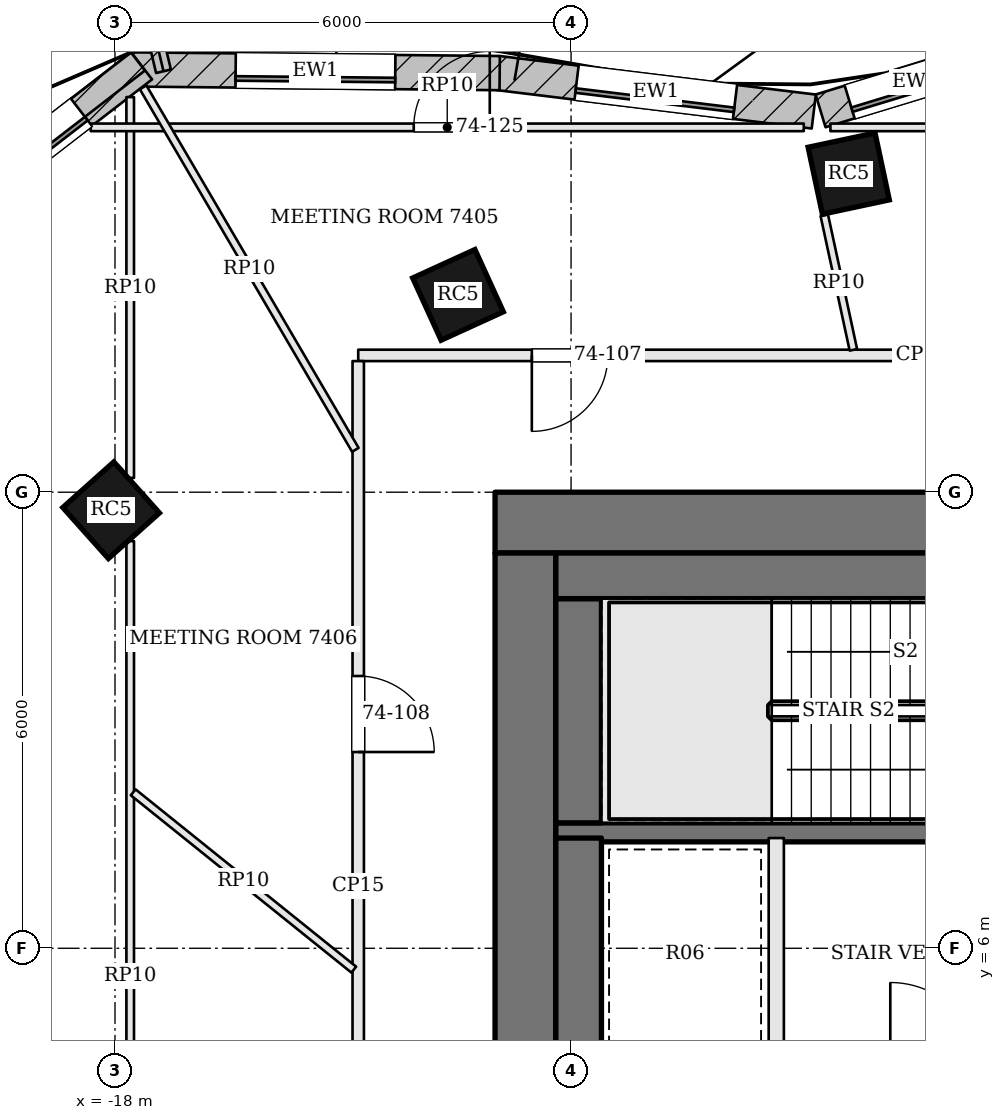
"""IFC4 building model, lengths in metres.
Left out: names, types, materials, properties, quantities, classifications, styles, units other than length and angle.
Written with IfcOpenShell. Run it as: python <this file> out.ifc"""

import sys

from ifc_helpers import new_model, si_unit, direction, frame, frame_2d, origin, origin_2d, place, context, subcontext, project, spatial, rectangle, extrude, element, fill, save


model = new_model("IFC4")
c1 = context("Model", 3, precision=1e-05, world=origin(), true_north=direction((0.0, 1.0)))
c2 = subcontext(c1, "Body", "Model", "MODEL_VIEW")
j1 = project(units=[si_unit("LENGTHUNIT", "METRE"), si_unit("PLANEANGLEUNIT", "RADIAN")], contexts=[c1])
p1 = place(None, origin())
s1 = spatial("IfcSite", under=j1, at=p1, CompositionType="ELEMENT")
p2 = place(p1, origin())
s2 = spatial("IfcBuilding", under=s1, at=p2, CompositionType="ELEMENT")
p3 = place(p2, frame((0.0, 0.0, 300.0)))
s3 = spatial("IfcBuildingStorey", under=s2, at=p3, CompositionType="ELEMENT", Elevation=300.0)
p4 = place(p3, frame((-13.0, 11.6, 0.0), z_axis=(0.0, 0.0, 1.0), x_axis=(1.0, 0.0, 0.0)))
e1 = element("IfcWall", 1, at=p4, inside=s3, PredefinedType="SHEAR", context=c2, shape_type="SweptSolid", body=[
    extrude(rectangle(XDim=26.0, YDim=0.8, at=frame_2d((13.0, 0.0))), origin(), (0.0, 0.0, 1.0), 3.9),
])
p5 = place(p4, frame((8.975, 0.0, 0.0)))
e2 = element("IfcOpeningElement", 2, at=p5, cuts=e1, PredefinedType="OPENING", context=c2, shape_type="SweptSolid", body=[
    extrude(rectangle(XDim=0.7, YDim=2.1, at=frame_2d((0.35, 1.05))), frame((0.0, 0.41, 0.0), z_axis=(0.0, -1.0, 0.0), x_axis=(1.0, 0.0, 0.0)), (0.0, 0.0, 1.0), 0.82),
])
p6 = place(p4, frame((11.025, 0.0, 0.0)))
e3 = element("IfcOpeningElement", 3, at=p6, cuts=e1, PredefinedType="OPENING", context=c2, shape_type="SweptSolid", body=[
    extrude(rectangle(XDim=0.7, YDim=2.1, at=frame_2d((0.35, 1.05))), frame((0.0, 0.41, 0.0), z_axis=(0.0, -1.0, 0.0), x_axis=(1.0, 0.0, 0.0)), (0.0, 0.0, 1.0), 0.82),
])
p7 = place(p4, frame((12.925, 0.0, 0.0)))
e4 = element("IfcOpeningElement", 4, at=p7, cuts=e1, PredefinedType="OPENING", context=c2, shape_type="SweptSolid", body=[
    extrude(rectangle(XDim=1.0, YDim=2.1, at=frame_2d((0.5, 1.05))), frame((0.0, 0.41, 0.0), z_axis=(0.0, -1.0, 0.0), x_axis=(1.0, 0.0, 0.0)), (0.0, 0.0, 1.0), 0.82),
])
p8 = place(p4, frame((15.775, 0.0, 0.0)))
e5 = element("IfcOpeningElement", 5, at=p8, cuts=e1, PredefinedType="OPENING", context=c2, shape_type="SweptSolid", body=[
    extrude(rectangle(XDim=1.0, YDim=2.1, at=frame_2d((0.5, 1.05))), frame((0.0, 0.41, 0.0), z_axis=(0.0, -1.0, 0.0), x_axis=(1.0, 0.0, 0.0)), (0.0, 0.0, 1.0), 0.82),
])
p9 = place(p3, frame((-12.6, -2.2, 0.0), z_axis=(0.0, 0.0, 1.0), x_axis=(0.0, 1.0, 0.0)))
e6 = element("IfcWall", 6, at=p9, inside=s3, PredefinedType="SHEAR", context=c2, shape_type="SweptSolid", body=[
    extrude(rectangle(XDim=13.4, YDim=0.8, at=frame_2d((6.7, 0.0))), origin(), (0.0, 0.0, 1.0), 3.9),
])
p10 = place(p9, frame((4.2, 0.0, 0.0)))
e7 = element("IfcOpeningElement", 7, at=p10, cuts=e6, PredefinedType="OPENING", context=c2, shape_type="SweptSolid", body=[
    extrude(rectangle(XDim=1.8, YDim=2.1, at=frame_2d((0.9, 1.05))), frame((0.0, 0.41, 0.0), z_axis=(0.0, -1.0, 0.0), x_axis=(1.0, 0.0, 0.0)), (0.0, 0.0, 1.0), 0.82),
])
for number, where, z_axis, x_axis in (
    (8, (-8.347, 16.192, 0.0), (0.0, 0.0, 1.0), (-0.978, -0.209, 0.0)),
    (9, (-13.487, 14.596, 0.0), (0.0, 0.0, 1.0), (-0.91, -0.415, 0.0)),
    (10, (-18.051, 11.763, 0.0), (0.0, 0.0, 1.0), (-0.746, -0.666, 0.0)),
):
    element("IfcColumn", number, at=place(p3, frame(where, z_axis=z_axis, x_axis=x_axis)), inside=s3, PredefinedType="COLUMN", context=c2, shape_type="SweptSolid", body=[
        extrude(rectangle(XDim=0.9, YDim=0.9, at=origin_2d()), origin(), (0.0, 0.0, 1.0), 3.9),
    ])
p11 = place(p3, frame((-6.229, 17.774, 0.0), z_axis=(0.0, 0.0, 1.0), x_axis=(-0.95663749396, -0.291281144515, 0.0)))
e11 = element("IfcWall", 11, at=p11, inside=s3, PredefinedType="SOLIDWALL", context=c2, shape_type="SweptSolid", body=[
    extrude(rectangle(XDim=2.601, YDim=0.45, at=frame_2d((1.3, 0.0))), origin(), (0.0, 0.0, 1.0), 3.7),
])
p12 = place(p11, frame((0.4, 0.0, 0.9)))
e12 = element("IfcOpeningElement", 12, at=p12, cuts=e11, PredefinedType="OPENING", context=c2, shape_type="SweptSolid", body=[
    extrude(rectangle(XDim=1.8, YDim=2.3, at=frame_2d((0.9, 1.15))), frame((0.0, 0.235, 0.0), z_axis=(0.0, -1.0, 0.0), x_axis=(1.0, 0.0, 0.0)), (0.0, 0.0, 1.0), 0.47),
])
p13 = place(p3, frame((-8.807, 17.008, 0.0), z_axis=(0.0, 0.0, 1.0), x_axis=(-0.992654419289, 0.120984312483, 0.0)))
e13 = element("IfcWall", 13, at=p13, inside=s3, PredefinedType="SOLIDWALL", context=c2, shape_type="SweptSolid", body=[
    extrude(rectangle(XDim=4.187, YDim=0.45, at=frame_2d((2.094, 0.0))), origin(), (0.0, 0.0, 1.0), 3.7),
])
p14 = place(p13, frame((1.044, 0.0, 0.9)))
e14 = element("IfcOpeningElement", 14, at=p14, cuts=e13, PredefinedType="OPENING", context=c2, shape_type="SweptSolid", body=[
    extrude(rectangle(XDim=2.1, YDim=2.3, at=frame_2d((1.05, 1.15))), frame((0.0, 0.235, 0.0), z_axis=(0.0, -1.0, 0.0), x_axis=(1.0, 0.0, 0.0)), (0.0, 0.0, 1.0), 0.47),
])
p15 = place(p3, frame((-12.939, 17.514, 0.0), z_axis=(0.0, 0.0, 1.0), x_axis=(-0.999950280333, 0.00997180335, 0.0)))
e15 = element("IfcWall", 15, at=p15, inside=s3, PredefinedType="SOLIDWALL", context=c2, shape_type="SweptSolid", body=[
    extrude(rectangle(XDim=4.848, YDim=0.45, at=frame_2d((2.424, 0.0))), origin(), (0.0, 0.0, 1.0), 3.7),
])
p16 = place(p15, frame((1.374, 0.0, 0.9)))
e16 = element("IfcOpeningElement", 16, at=p16, cuts=e15, PredefinedType="OPENING", context=c2, shape_type="SweptSolid", body=[
    extrude(rectangle(XDim=2.1, YDim=2.3, at=frame_2d((1.05, 1.15))), frame((0.0, 0.235, 0.0), z_axis=(0.0, -1.0, 0.0), x_axis=(1.0, 0.0, 0.0)), (0.0, 0.0, 1.0), 0.47),
])
p17 = place(p3, frame((-17.649, 17.609, 0.0), z_axis=(0.0, 0.0, 1.0), x_axis=(-0.791693388686, -0.610918634771, 0.0)))
e17 = element("IfcWall", 17, at=p17, inside=s3, PredefinedType="SOLIDWALL", context=c2, shape_type="SweptSolid", body=[
    extrude(rectangle(XDim=4.1, YDim=0.45, at=frame_2d((2.05, 0.0))), origin(), (0.0, 0.0, 1.0), 3.7),
])
p18 = place(p17, frame((1.0, 0.0, 0.9)))
e18 = element("IfcOpeningElement", 18, at=p18, cuts=e17, PredefinedType="OPENING", context=c2, shape_type="SweptSolid", body=[
    extrude(rectangle(XDim=2.1, YDim=2.3, at=frame_2d((1.05, 1.15))), frame((0.0, 0.235, 0.0), z_axis=(0.0, -1.0, 0.0), x_axis=(1.0, 0.0, 0.0)), (0.0, 0.0, 1.0), 0.47),
])
p19 = place(p3, frame((-17.362, 17.538, 0.0), z_axis=(0.0, 0.0, 1.0), x_axis=(-0.230469860183, 0.973079464148, 0.0)))
e19 = element("IfcWall", 19, at=p19, inside=s3, PredefinedType="SOLIDWALL", context=c2, shape_type="SweptSolid", body=[
    extrude(rectangle(XDim=1.75, YDim=0.2, at=frame_2d((0.875, 0.0))), origin(), (0.0, 0.0, 1.0), 3.7),
])
p20 = place(p3, frame((-17.698, 17.666, 3.9), z_axis=(0.0, 0.0, 1.0), x_axis=(-0.791652356246, -0.610971805282, 0.0)))
e20 = element("IfcWall", 20, at=p20, inside=s3, PredefinedType="PARAPET", context=c2, shape_type="SweptSolid", body=[
    extrude(rectangle(XDim=3.974, YDim=0.3, at=frame_2d((1.987, 0.0))), origin(), (0.0, 0.0, 1.0), 1.1),
])
p21 = place(p3, frame((-12.2, 7.525, 0.0), z_axis=(0.0, 0.0, 1.0), x_axis=(1.0, 0.0, 0.0)))
e21 = element("IfcWall", 21, at=p21, inside=s3, PredefinedType="SOLIDWALL", context=c2, shape_type="SweptSolid", body=[
    extrude(rectangle(XDim=7.1, YDim=0.25, at=frame_2d((3.55, 0.0))), origin(), (0.0, 0.0, 1.0), 3.7),
])
p22 = place(p21, frame((5.8, 0.0, 0.0)))
e22 = element("IfcOpeningElement", 22, at=p22, cuts=e21, PredefinedType="OPENING", context=c2, shape_type="SweptSolid", body=[
    extrude(rectangle(XDim=1.2, YDim=2.1, at=frame_2d((0.6, 1.05))), frame((0.0, 0.135, 0.0), z_axis=(0.0, -1.0, 0.0), x_axis=(1.0, 0.0, 0.0)), (0.0, 0.0, 1.0), 0.27),
])
p23 = place(p3, frame((-9.3, 4.45, 0.0), z_axis=(0.0, 0.0, 1.0), x_axis=(0.0, 1.0, 0.0)))
e23 = element("IfcWall", 23, at=p23, inside=s3, PredefinedType="SOLIDWALL", context=c2, shape_type="SweptSolid", body=[
    extrude(rectangle(XDim=3.0, YDim=0.2, at=frame_2d((1.5, 0.0))), origin(), (0.0, 0.0, 1.0), 3.7),
])
p24 = place(p3, frame((-11.9, 4.45, 0.0), z_axis=(0.0, 0.0, 1.0), x_axis=(0.0, 1.0, 0.0)))
e24 = element("IfcWall", 24, at=p24, inside=s3, PredefinedType="SOLIDWALL", context=c2, shape_type="SweptSolid", body=[
    extrude(rectangle(XDim=3.0, YDim=0.6, at=frame_2d((1.5, 0.0))), origin(), (0.0, 0.0, 1.0), 3.7),
])
p25 = place(p3, frame((-11.9, 7.65, 0.0), z_axis=(0.0, 0.0, 1.0), x_axis=(0.0, 1.0, 0.0)))
e25 = element("IfcWall", 25, at=p25, inside=s3, PredefinedType="SOLIDWALL", context=c2, shape_type="SweptSolid", body=[
    extrude(rectangle(XDim=2.95, YDim=0.6, at=frame_2d((1.475, 0.0))), origin(), (0.0, 0.0, 1.0), 3.7),
])
p26 = place(p3, frame((-12.2, 10.9, 0.0), z_axis=(0.0, 0.0, 1.0), x_axis=(1.0, 0.0, 0.0)))
e26 = element("IfcWall", 26, at=p26, inside=s3, PredefinedType="SOLIDWALL", context=c2, shape_type="SweptSolid", body=[
    extrude(rectangle(XDim=7.1, YDim=0.6, at=frame_2d((3.55, 0.0))), origin(), (0.0, 0.0, 1.0), 3.7),
])
p27 = place(p3, frame((0.034, 13.8, 0.0), z_axis=(0.0, 0.0, 1.0), x_axis=(-1.0, 0.0, 0.0)))
e27 = element("IfcWall", 27, at=p27, inside=s3, PredefinedType="PARTITIONING", context=c2, shape_type="SweptSolid", body=[
    extrude(rectangle(XDim=14.834, YDim=0.15, at=frame_2d((7.417, 0.0))), origin(), (0.0, 0.0, 1.0), 3.198),
])
p28 = place(p27, frame((3.214, 0.0, 0.0)))
e28 = element("IfcOpeningElement", 28, at=p28, cuts=e27, PredefinedType="OPENING", context=c2, shape_type="SweptSolid", body=[
    extrude(rectangle(XDim=1.8, YDim=2.1, at=frame_2d((0.9, 1.05))), frame((0.0, 0.085, 0.0), z_axis=(0.0, -1.0, 0.0), x_axis=(1.0, 0.0, 0.0)), (0.0, 0.0, 1.0), 0.17),
])
p29 = place(p27, frame((11.55, 0.0, 0.0)))
e29 = element("IfcOpeningElement", 29, at=p29, cuts=e27, PredefinedType="OPENING", context=c2, shape_type="SweptSolid", body=[
    extrude(rectangle(XDim=1.0, YDim=2.4, at=frame_2d((0.5, 1.2))), frame((0.0, 0.085, 0.0), z_axis=(0.0, -1.0, 0.0), x_axis=(1.0, 0.0, 0.0)), (0.0, 0.0, 1.0), 0.17),
])
p30 = place(p3, frame((-14.8, 13.725, 0.0), z_axis=(0.0, 0.0, 1.0), x_axis=(0.0, -1.0, 0.0)))
e30 = element("IfcWall", 30, at=p30, inside=s3, PredefinedType="PARTITIONING", context=c2, shape_type="SweptSolid", body=[
    extrude(rectangle(XDim=13.821, YDim=0.15, at=frame_2d((6.911, 0.0))), origin(), (0.0, 0.0, 1.0), 3.198),
])
p31 = place(p30, frame((4.143, 0.0, 0.0)))
e31 = element("IfcOpeningElement", 31, at=p31, cuts=e30, PredefinedType="OPENING", context=c2, shape_type="SweptSolid", body=[
    extrude(rectangle(XDim=1.0, YDim=2.4, at=frame_2d((0.5, 1.2))), frame((0.0, 0.085, 0.0), z_axis=(0.0, -1.0, 0.0), x_axis=(1.0, 0.0, 0.0)), (0.0, 0.0, 1.0), 0.17),
])
p32 = place(p30, frame((10.35, 0.0, 0.0)))
e32 = element("IfcOpeningElement", 32, at=p32, cuts=e30, PredefinedType="OPENING", context=c2, shape_type="SweptSolid", body=[
    extrude(rectangle(XDim=1.0, YDim=2.1, at=frame_2d((0.5, 1.05))), frame((0.0, 0.085, 0.0), z_axis=(0.0, -1.0, 0.0), x_axis=(1.0, 0.0, 0.0)), (0.0, 0.0, 1.0), 0.17),
])
p33 = place(p3, frame((-17.8, -0.09, 0.0), z_axis=(0.0, 0.0, 1.0), x_axis=(0.0, 1.0, 0.0)))
e33 = element("IfcWall", 33, at=p33, inside=s3, PredefinedType="PARTITIONING", context=c2, shape_type="SweptSolid", body=[
    extrude(rectangle(XDim=11.447, YDim=0.1, at=frame_2d((5.724, 0.0))), origin(), (0.0, 0.0, 1.0), 3.184),
])
p34 = place(p33, frame((2.748, 0.0, 0.0)))
e34 = element("IfcOpeningElement", 34, at=p34, cuts=e33, PredefinedType="OPENING", context=c2, shape_type="SweptSolid", body=[
    extrude(rectangle(XDim=0.9, YDim=2.1, at=frame_2d((0.45, 1.05))), frame((0.0, 0.06, 0.0), z_axis=(0.0, -1.0, 0.0), x_axis=(1.0, 0.0, 0.0)), (0.0, 0.0, 1.0), 0.12),
])
p35 = place(p3, frame((-17.8, 12.188, 0.0), z_axis=(0.0, 0.0, 1.0), x_axis=(0.0, 1.0, 0.0)))
e35 = element("IfcWall", 35, at=p35, inside=s3, PredefinedType="PARTITIONING", context=c2, shape_type="SweptSolid", body=[
    extrude(rectangle(XDim=5.011, YDim=0.1, at=frame_2d((2.505, 0.0))), origin(), (0.0, 0.0, 1.0), 3.184),
])
p36 = place(p3, frame((-18.319, 16.8, 0.0), z_axis=(0.0, 0.0, 1.0), x_axis=(1.0, 0.0, 0.0)))
e36 = element("IfcWall", 36, at=p36, inside=s3, PredefinedType="PARTITIONING", context=c2, shape_type="SweptSolid", body=[
    extrude(rectangle(XDim=9.381, YDim=0.1, at=frame_2d((4.69, 0.0))), origin(), (0.0, 0.0, 1.0), 3.184),
])
p37 = place(p36, frame((4.25, 0.0, 0.0)))
e37 = element("IfcOpeningElement", 37, at=p37, cuts=e36, PredefinedType="OPENING", context=c2, shape_type="SweptSolid", body=[
    extrude(rectangle(XDim=1.0, YDim=2.4, at=frame_2d((0.5, 1.2))), frame((0.0, 0.06, 0.0), z_axis=(0.0, -1.0, 0.0), x_axis=(1.0, 0.0, 0.0)), (0.0, 0.0, 1.0), 0.12),
])
p38 = place(p3, frame((-8.588, 16.8, 0.0), z_axis=(0.0, 0.0, 1.0), x_axis=(1.0, 0.0, 0.0)))
e38 = element("IfcWall", 38, at=p38, inside=s3, PredefinedType="PARTITIONING", context=c2, shape_type="SweptSolid", body=[
    extrude(rectangle(XDim=5.12, YDim=0.1, at=frame_2d((2.56, 0.0))), origin(), (0.0, 0.0, 1.0), 3.184),
])
p39 = place(p3, frame((-8.286, 13.873, 0.0), z_axis=(0.0, 0.0, 1.0), x_axis=(-0.21131538294, 0.977417929513, 0.0)))
e39 = element("IfcWall", 39, at=p39, inside=s3, PredefinedType="PARTITIONING", context=c2, shape_type="SweptSolid", body=[
    extrude(rectangle(XDim=1.81, YDim=0.1, at=frame_2d((0.905, 0.0))), origin(), (0.0, 0.0, 1.0), 3.184),
])
p40 = place(p3, frame((-14.838, 12.558, 0.0), z_axis=(0.0, 0.0, 1.0), x_axis=(-0.505293152316, 0.862947756369, 0.0)))
e40 = element("IfcWall", 40, at=p40, inside=s3, PredefinedType="PARTITIONING", context=c2, shape_type="SweptSolid", body=[
    extrude(rectangle(XDim=5.526, YDim=0.1, at=frame_2d((2.763, 0.0))), origin(), (0.0, 0.0, 1.0), 3.184),
])
p41 = place(p3, frame((-14.858, 5.719, 0.0), z_axis=(0.0, 0.0, 1.0), x_axis=(-0.779434046092, 0.626484291737, 0.0)))
e41 = element("IfcWall", 41, at=p41, inside=s3, PredefinedType="PARTITIONING", context=c2, shape_type="SweptSolid", body=[
    extrude(rectangle(XDim=3.724, YDim=0.1, at=frame_2d((1.862, 0.0))), origin(), (0.0, 0.0, 1.0), 3.184),
])
p42 = place(p12, origin())
e42 = element("IfcWindow", 42, at=p42, inside=s3, PartitioningType="SINGLE_PANEL", PredefinedType="WINDOW", context=c2, shape_type="SweptSolid", body=[
    extrude(rectangle(XDim=1.8, YDim=2.3, at=frame_2d((0.9, 1.15))), frame((0.0, 0.135, 0.0), z_axis=(0.0, -1.0, 0.0), x_axis=(1.0, 0.0, 0.0)), (0.0, 0.0, 1.0), 0.06),
])
fill(e12, e42)
p43 = place(p14, origin())
e43 = element("IfcWindow", 43, at=p43, inside=s3, PartitioningType="SINGLE_PANEL", PredefinedType="WINDOW", context=c2, shape_type="SweptSolid", body=[
    extrude(rectangle(XDim=2.1, YDim=2.3, at=frame_2d((1.05, 1.15))), frame((0.0, 0.135, 0.0), z_axis=(0.0, -1.0, 0.0), x_axis=(1.0, 0.0, 0.0)), (0.0, 0.0, 1.0), 0.06),
])
fill(e14, e43)
p44 = place(p16, origin())
e44 = element("IfcWindow", 44, at=p44, inside=s3, PartitioningType="SINGLE_PANEL", PredefinedType="WINDOW", context=c2, shape_type="SweptSolid", body=[
    extrude(rectangle(XDim=2.1, YDim=2.3, at=frame_2d((1.05, 1.15))), frame((0.0, 0.135, 0.0), z_axis=(0.0, -1.0, 0.0), x_axis=(1.0, 0.0, 0.0)), (0.0, 0.0, 1.0), 0.06),
])
fill(e16, e44)
p45 = place(p18, origin())
e45 = element("IfcWindow", 45, at=p45, inside=s3, PartitioningType="SINGLE_PANEL", PredefinedType="WINDOW", context=c2, shape_type="SweptSolid", body=[
    extrude(rectangle(XDim=2.1, YDim=2.3, at=frame_2d((1.05, 1.15))), frame((0.0, 0.135, 0.0), z_axis=(0.0, -1.0, 0.0), x_axis=(1.0, 0.0, 0.0)), (0.0, 0.0, 1.0), 0.06),
])
fill(e18, e45)
p46 = place(p29, origin())
e46 = element("IfcDoor", 46, at=p46, inside=s3, OperationType="SINGLE_SWING_RIGHT", PredefinedType="DOOR", context=c2, shape_type="SweptSolid", body=[
    extrude(rectangle(XDim=1.0, YDim=2.4, at=frame_2d((0.5, 1.2))), frame((0.0, 0.025, 0.0), z_axis=(0.0, -1.0, 0.0), x_axis=(1.0, 0.0, 0.0)), (0.0, 0.0, 1.0), 0.05),
])
fill(e29, e46)
p47 = place(p31, origin())
e47 = element("IfcDoor", 47, at=p47, inside=s3, OperationType="SINGLE_SWING_RIGHT", PredefinedType="DOOR", context=c2, shape_type="SweptSolid", body=[
    extrude(rectangle(XDim=1.0, YDim=2.4, at=frame_2d((0.5, 1.2))), frame((0.0, 0.025, 0.0), z_axis=(0.0, -1.0, 0.0), x_axis=(1.0, 0.0, 0.0)), (0.0, 0.0, 1.0), 0.05),
])
fill(e31, e47)
p48 = place(p37, origin())
e48 = element("IfcDoor", 48, at=p48, inside=s3, OperationType="SINGLE_SWING_RIGHT", PredefinedType="DOOR", context=c2, shape_type="SweptSolid", body=[
    extrude(rectangle(XDim=1.0, YDim=2.4, at=frame_2d((0.5, 1.2))), frame((0.0, 0.025, 0.0), z_axis=(0.0, -1.0, 0.0), x_axis=(1.0, 0.0, 0.0)), (0.0, 0.0, 1.0), 0.05),
])
fill(e37, e48)
save(model, sys.argv[1])
